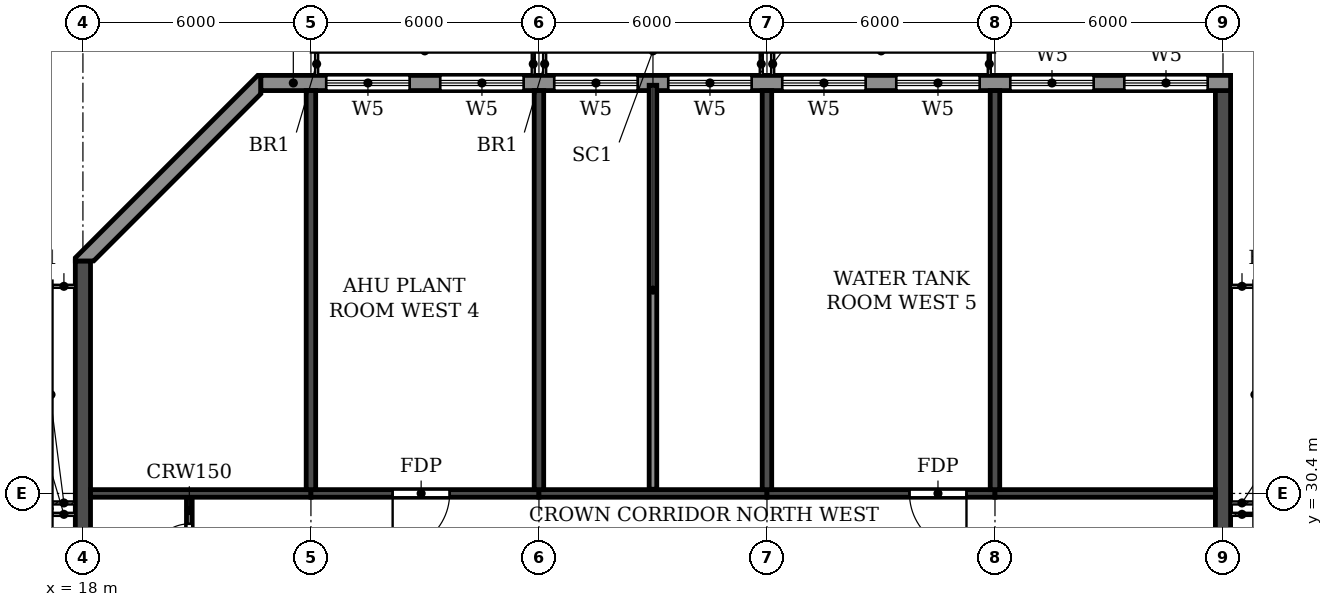
"""IFC4 building model, lengths in metres.
Left out: names, types, materials, properties, quantities, classifications, styles, units other than length and angle.
Written with IfcOpenShell. Run it as: python <this file> out.ifc"""

import sys

from ifc_helpers import new_model, si_unit, direction, frame, frame_2d, origin, place, context, subcontext, project, spatial, polyline, rectangle, outline, extrude, element, fill, save


model = new_model("IFC4")
c1 = context("Model", 3, precision=1e-05, world=origin(), true_north=direction((0.0, 1.0)))
c2 = subcontext(c1, "Body", "Model", "MODEL_VIEW")
j1 = project(units=[si_unit("LENGTHUNIT", "METRE"), si_unit("PLANEANGLEUNIT", "RADIAN")], contexts=[c1])
p1 = place(None, origin())
s1 = spatial("IfcSite", under=j1, at=p1, CompositionType="ELEMENT")
p2 = place(p1, origin())
s2 = spatial("IfcBuilding", under=s1, at=p2, CompositionType="ELEMENT")
p3 = place(p2, frame((0.0, 0.0, 279.0)))
s3 = spatial("IfcBuildingStorey", under=s2, at=p3, CompositionType="ELEMENT", Elevation=279.0)
for number, where, z_axis, x_axis in (
    (1, (24.0, 30.5, 0.0), (0.0, 0.0, 1.0), (0.0, 1.0, 0.0)),
    (2, (30.0, 30.5, 0.0), (0.0, 0.0, 1.0), (0.0, 1.0, 0.0)),
    (3, (36.0, 30.5, 0.0), (0.0, 0.0, 1.0), (0.0, 1.0, 0.0)),
    (4, (42.0, 30.5, 0.0), (0.0, 0.0, 1.0), (0.0, 1.0, 0.0)),
):
    element("IfcWall", number, at=place(p3, frame(where, z_axis=z_axis, x_axis=x_axis)), inside=s3, PredefinedType="SHEAR", context=c2, shape_type="SweptSolid", body=[
        extrude(rectangle(XDim=10.5, YDim=0.25, at=frame_2d((5.25, 0.0))), origin(), (0.0, 0.0, 1.0), 3.05),
    ])
p4 = place(p3, frame((18.0, 4.683, 0.0), z_axis=(0.0, 0.0, 1.0), x_axis=(0.0, 1.0, 0.0)))
e5 = element("IfcWall", 5, at=p4, inside=s3, PredefinedType="SHEAR", context=c2, shape_type="SweptSolid", body=[
    extrude(rectangle(XDim=31.834, YDim=0.4, at=frame_2d((15.917, 0.0))), origin(), (0.0, 0.0, 1.0), 3.05),
])
p5 = place(p3, frame((48.0, 0.2, 0.0), z_axis=(0.0, 0.0, 1.0), x_axis=(0.0, 1.0, 0.0)))
e6 = element("IfcWall", 6, at=p5, inside=s3, PredefinedType="SHEAR", context=c2, shape_type="SweptSolid", body=[
    extrude(rectangle(XDim=40.8, YDim=0.4, at=frame_2d((20.4, 0.0))), origin(), (0.0, 0.0, 1.0), 3.05),
])
p6 = place(p3, frame((18.2, 30.4, 0.0), z_axis=(0.0, 0.0, 1.0), x_axis=(1.0, 0.0, 0.0)))
e7 = element("IfcWall", 7, at=p6, inside=s3, PredefinedType="SHEAR", context=c2, shape_type="SweptSolid", body=[
    extrude(rectangle(XDim=5.8, YDim=0.2, at=frame_2d((2.9, 0.0))), origin(), (0.0, 0.0, 1.0), 2.45),
])
p7 = place(p3, frame((24.0, 30.4, 0.0), z_axis=(0.0, 0.0, 1.0), x_axis=(1.0, 0.0, 0.0)))
e8 = element("IfcWall", 8, at=p7, inside=s3, PredefinedType="SHEAR", context=c2, shape_type="SweptSolid", body=[
    extrude(rectangle(XDim=6.0, YDim=0.2, at=frame_2d((3.0, 0.0))), origin(), (0.0, 0.0, 1.0), 2.45),
])
p8 = place(p7, frame((2.15, 0.0, 0.0)))
e9 = element("IfcOpeningElement", 9, at=p8, cuts=e8, PredefinedType="OPENING", context=c2, shape_type="SweptSolid", body=[
    extrude(rectangle(XDim=1.5, YDim=2.1, at=frame_2d((0.75, 1.05))), frame((0.0, 0.11, 0.0), z_axis=(0.0, -1.0, 0.0), x_axis=(1.0, 0.0, 0.0)), (0.0, 0.0, 1.0), 0.22),
])
p9 = place(p3, frame((30.0, 30.4, 0.0), z_axis=(0.0, 0.0, 1.0), x_axis=(1.0, 0.0, 0.0)))
e10 = element("IfcWall", 10, at=p9, inside=s3, PredefinedType="SHEAR", context=c2, shape_type="SweptSolid", body=[
    extrude(rectangle(XDim=6.0, YDim=0.2, at=frame_2d((3.0, 0.0))), origin(), (0.0, 0.0, 1.0), 2.45),
])
p10 = place(p3, frame((36.0, 30.4, 0.0), z_axis=(0.0, 0.0, 1.0), x_axis=(1.0, 0.0, 0.0)))
e11 = element("IfcWall", 11, at=p10, inside=s3, PredefinedType="SHEAR", context=c2, shape_type="SweptSolid", body=[
    extrude(rectangle(XDim=6.0, YDim=0.2, at=frame_2d((3.0, 0.0))), origin(), (0.0, 0.0, 1.0), 2.45),
])
p11 = place(p10, frame((3.75, 0.0, 0.0)))
e12 = element("IfcOpeningElement", 12, at=p11, cuts=e11, PredefinedType="OPENING", context=c2, shape_type="SweptSolid", body=[
    extrude(rectangle(XDim=1.5, YDim=2.1, at=frame_2d((0.75, 1.05))), frame((0.0, 0.11, 0.0), z_axis=(0.0, -1.0, 0.0), x_axis=(1.0, 0.0, 0.0)), (0.0, 0.0, 1.0), 0.22),
])
p12 = place(p3, frame((42.0, 30.4, 0.0), z_axis=(0.0, 0.0, 1.0), x_axis=(1.0, 0.0, 0.0)))
e13 = element("IfcWall", 13, at=p12, inside=s3, PredefinedType="SHEAR", context=c2, shape_type="SweptSolid", body=[
    extrude(rectangle(XDim=5.8, YDim=0.2, at=frame_2d((2.9, 0.0))), origin(), (0.0, 0.0, 1.0), 2.45),
])
p13 = place(p3, frame((48.2, 41.2, 0.0), z_axis=(0.0, 0.0, 1.0), x_axis=(-1.0, 0.0, 0.0)))
e14 = element("IfcWall", 14, at=p13, inside=s3, PredefinedType="STANDARD", context=c2, shape_type="SweptSolid", body=[
    extrude(rectangle(XDim=25.517, YDim=0.4, at=frame_2d((12.759, 0.0))), origin(), (0.0, 0.0, 1.0), 3.05),
])
p14 = place(p13, frame((21.6, 0.0, 0.6)))
e15 = element("IfcOpeningElement", 15, at=p14, cuts=e14, PredefinedType="OPENING", context=c2, shape_type="SweptSolid", body=[
    extrude(rectangle(XDim=2.2, YDim=2.4, at=frame_2d((1.1, 1.2))), frame((0.0, 0.21, 0.0), z_axis=(0.0, -1.0, 0.0), x_axis=(1.0, 0.0, 0.0)), (0.0, 0.0, 1.0), 0.42),
])
p15 = place(p13, frame((18.6, 0.0, 0.6)))
e16 = element("IfcOpeningElement", 16, at=p15, cuts=e14, PredefinedType="OPENING", context=c2, shape_type="SweptSolid", body=[
    extrude(rectangle(XDim=2.2, YDim=2.4, at=frame_2d((1.1, 1.2))), frame((0.0, 0.21, 0.0), z_axis=(0.0, -1.0, 0.0), x_axis=(1.0, 0.0, 0.0)), (0.0, 0.0, 1.0), 0.42),
])
p16 = place(p13, frame((15.6, 0.0, 0.6)))
e17 = element("IfcOpeningElement", 17, at=p16, cuts=e14, PredefinedType="OPENING", context=c2, shape_type="SweptSolid", body=[
    extrude(rectangle(XDim=2.2, YDim=2.4, at=frame_2d((1.1, 1.2))), frame((0.0, 0.21, 0.0), z_axis=(0.0, -1.0, 0.0), x_axis=(1.0, 0.0, 0.0)), (0.0, 0.0, 1.0), 0.42),
])
p17 = place(p13, frame((12.6, 0.0, 0.6)))
e18 = element("IfcOpeningElement", 18, at=p17, cuts=e14, PredefinedType="OPENING", context=c2, shape_type="SweptSolid", body=[
    extrude(rectangle(XDim=2.2, YDim=2.4, at=frame_2d((1.1, 1.2))), frame((0.0, 0.21, 0.0), z_axis=(0.0, -1.0, 0.0), x_axis=(1.0, 0.0, 0.0)), (0.0, 0.0, 1.0), 0.42),
])
p18 = place(p13, frame((9.6, 0.0, 0.6)))
e19 = element("IfcOpeningElement", 19, at=p18, cuts=e14, PredefinedType="OPENING", context=c2, shape_type="SweptSolid", body=[
    extrude(rectangle(XDim=2.2, YDim=2.4, at=frame_2d((1.1, 1.2))), frame((0.0, 0.21, 0.0), z_axis=(0.0, -1.0, 0.0), x_axis=(1.0, 0.0, 0.0)), (0.0, 0.0, 1.0), 0.42),
])
p19 = place(p13, frame((6.6, 0.0, 0.6)))
e20 = element("IfcOpeningElement", 20, at=p19, cuts=e14, PredefinedType="OPENING", context=c2, shape_type="SweptSolid", body=[
    extrude(rectangle(XDim=2.2, YDim=2.4, at=frame_2d((1.1, 1.2))), frame((0.0, 0.21, 0.0), z_axis=(0.0, -1.0, 0.0), x_axis=(1.0, 0.0, 0.0)), (0.0, 0.0, 1.0), 0.42),
])
p20 = place(p13, frame((3.6, 0.0, 0.6)))
e21 = element("IfcOpeningElement", 21, at=p20, cuts=e14, PredefinedType="OPENING", context=c2, shape_type="SweptSolid", body=[
    extrude(rectangle(XDim=2.2, YDim=2.4, at=frame_2d((1.1, 1.2))), frame((0.0, 0.21, 0.0), z_axis=(0.0, -1.0, 0.0), x_axis=(1.0, 0.0, 0.0)), (0.0, 0.0, 1.0), 0.42),
])
p21 = place(p13, frame((0.6, 0.0, 0.6)))
e22 = element("IfcOpeningElement", 22, at=p21, cuts=e14, PredefinedType="OPENING", context=c2, shape_type="SweptSolid", body=[
    extrude(rectangle(XDim=2.2, YDim=2.4, at=frame_2d((1.1, 1.2))), frame((0.0, 0.21, 0.0), z_axis=(0.0, -1.0, 0.0), x_axis=(1.0, 0.0, 0.0)), (0.0, 0.0, 1.0), 0.42),
])
p22 = place(p3, origin())
e23 = element("IfcWall", 23, at=p22, inside=s3, PredefinedType="STANDARD", context=c2, shape_type="SweptSolid", body=[
    extrude(outline(polyline([(22.683, 41.4), (22.6, 41.4), (17.8, 36.6), (17.8, 36.517), (18.283, 36.517), (22.683, 40.917), (22.683, 41.4)])), origin(), (0.0, 0.0, 1.0), 3.05),
])
p23 = place(p3, frame((20.8, 27.9, 0.0), z_axis=(0.0, 0.0, 1.0), x_axis=(0.0, 1.0, 0.0)))
e24 = element("IfcWall", 24, at=p23, inside=s3, PredefinedType="PARTITIONING", context=c2, shape_type="SweptSolid", body=[
    extrude(rectangle(XDim=2.39, YDim=0.15, at=frame_2d((1.195, 0.0))), origin(), (0.0, 0.0, 1.0), 3.05),
])
p24 = place(p23, frame((0.7, 0.0, 0.0)))
e25 = element("IfcOpeningElement", 25, at=p24, cuts=e24, PredefinedType="OPENING", context=c2, shape_type="SweptSolid", body=[
    extrude(rectangle(XDim=1.0, YDim=2.1, at=frame_2d((0.5, 1.05))), frame((0.0, 0.085, 0.0), z_axis=(0.0, -1.0, 0.0), x_axis=(1.0, 0.0, 0.0)), (0.0, 0.0, 1.0), 0.17),
])
p25 = place(p3, frame((33.0, 30.51, 0.0), z_axis=(0.0, 0.0, 1.0), x_axis=(0.0, 1.0, 0.0)))
e26 = element("IfcWall", 26, at=p25, inside=s3, PredefinedType="PARTITIONING", context=c2, shape_type="SweptSolid", body=[
    extrude(rectangle(XDim=10.63, YDim=0.2, at=frame_2d((5.315, 0.0))), origin(), (0.0, 0.0, 1.0), 3.05),
])
p26 = place(p14, origin())
e27 = element("IfcWindow", 27, at=p26, inside=s3, PartitioningType="TRIPLE_PANEL_HORIZONTAL", PredefinedType="WINDOW", context=c2, shape_type="SweptSolid", body=[
    extrude(rectangle(XDim=2.2, YDim=2.4, at=frame_2d((1.1, 1.2))), frame((0.0, 0.03, 0.0), z_axis=(0.0, -1.0, 0.0), x_axis=(1.0, 0.0, 0.0)), (0.0, 0.0, 1.0), 0.06),
])
fill(e15, e27)
p27 = place(p15, origin())
e28 = element("IfcWindow", 28, at=p27, inside=s3, PartitioningType="TRIPLE_PANEL_HORIZONTAL", PredefinedType="WINDOW", context=c2, shape_type="SweptSolid", body=[
    extrude(rectangle(XDim=2.2, YDim=2.4, at=frame_2d((1.1, 1.2))), frame((0.0, 0.03, 0.0), z_axis=(0.0, -1.0, 0.0), x_axis=(1.0, 0.0, 0.0)), (0.0, 0.0, 1.0), 0.06),
])
fill(e16, e28)
p28 = place(p16, origin())
e29 = element("IfcWindow", 29, at=p28, inside=s3, PartitioningType="TRIPLE_PANEL_HORIZONTAL", PredefinedType="WINDOW", context=c2, shape_type="SweptSolid", body=[
    extrude(rectangle(XDim=2.2, YDim=2.4, at=frame_2d((1.1, 1.2))), frame((0.0, 0.03, 0.0), z_axis=(0.0, -1.0, 0.0), x_axis=(1.0, 0.0, 0.0)), (0.0, 0.0, 1.0), 0.06),
])
fill(e17, e29)
p29 = place(p17, origin())
e30 = element("IfcWindow", 30, at=p29, inside=s3, PartitioningType="TRIPLE_PANEL_HORIZONTAL", PredefinedType="WINDOW", context=c2, shape_type="SweptSolid", body=[
    extrude(rectangle(XDim=2.2, YDim=2.4, at=frame_2d((1.1, 1.2))), frame((0.0, 0.03, 0.0), z_axis=(0.0, -1.0, 0.0), x_axis=(1.0, 0.0, 0.0)), (0.0, 0.0, 1.0), 0.06),
])
fill(e18, e30)
p30 = place(p18, origin())
e31 = element("IfcWindow", 31, at=p30, inside=s3, PartitioningType="TRIPLE_PANEL_HORIZONTAL", PredefinedType="WINDOW", context=c2, shape_type="SweptSolid", body=[
    extrude(rectangle(XDim=2.2, YDim=2.4, at=frame_2d((1.1, 1.2))), frame((0.0, 0.03, 0.0), z_axis=(0.0, -1.0, 0.0), x_axis=(1.0, 0.0, 0.0)), (0.0, 0.0, 1.0), 0.06),
])
fill(e19, e31)
p31 = place(p19, origin())
e32 = element("IfcWindow", 32, at=p31, inside=s3, PartitioningType="TRIPLE_PANEL_HORIZONTAL", PredefinedType="WINDOW", context=c2, shape_type="SweptSolid", body=[
    extrude(rectangle(XDim=2.2, YDim=2.4, at=frame_2d((1.1, 1.2))), frame((0.0, 0.03, 0.0), z_axis=(0.0, -1.0, 0.0), x_axis=(1.0, 0.0, 0.0)), (0.0, 0.0, 1.0), 0.06),
])
fill(e20, e32)
p32 = place(p20, origin())
e33 = element("IfcWindow", 33, at=p32, inside=s3, PartitioningType="TRIPLE_PANEL_HORIZONTAL", PredefinedType="WINDOW", context=c2, shape_type="SweptSolid", body=[
    extrude(rectangle(XDim=2.2, YDim=2.4, at=frame_2d((1.1, 1.2))), frame((0.0, 0.03, 0.0), z_axis=(0.0, -1.0, 0.0), x_axis=(1.0, 0.0, 0.0)), (0.0, 0.0, 1.0), 0.06),
])
fill(e21, e33)
p33 = place(p21, origin())
e34 = element("IfcWindow", 34, at=p33, inside=s3, PartitioningType="TRIPLE_PANEL_HORIZONTAL", PredefinedType="WINDOW", context=c2, shape_type="SweptSolid", body=[
    extrude(rectangle(XDim=2.2, YDim=2.4, at=frame_2d((1.1, 1.2))), frame((0.0, 0.03, 0.0), z_axis=(0.0, -1.0, 0.0), x_axis=(1.0, 0.0, 0.0)), (0.0, 0.0, 1.0), 0.06),
])
fill(e22, e34)
p34 = place(p8, frame((1.5, 0.0, 0.0), z_axis=(0.0, 0.0, 1.0), x_axis=(-1.0, 0.0, 0.0)))
e35 = element("IfcDoor", 35, at=p34, inside=s3, OperationType="DOUBLE_DOOR_SINGLE_SWING", PredefinedType="DOOR", context=c2, shape_type="SweptSolid", body=[
    extrude(rectangle(XDim=1.5, YDim=2.1, at=frame_2d((0.75, 1.05))), frame((0.0, 0.025, 0.0), z_axis=(0.0, -1.0, 0.0), x_axis=(1.0, 0.0, 0.0)), (0.0, 0.0, 1.0), 0.05),
])
fill(e9, e35)
p35 = place(p11, frame((1.5, 0.0, 0.0), z_axis=(0.0, 0.0, 1.0), x_axis=(-1.0, 0.0, 0.0)))
e36 = element("IfcDoor", 36, at=p35, inside=s3, OperationType="DOUBLE_DOOR_SINGLE_SWING", PredefinedType="DOOR", context=c2, shape_type="SweptSolid", body=[
    extrude(rectangle(XDim=1.5, YDim=2.1, at=frame_2d((0.75, 1.05))), frame((0.0, 0.025, 0.0), z_axis=(0.0, -1.0, 0.0), x_axis=(1.0, 0.0, 0.0)), (0.0, 0.0, 1.0), 0.05),
])
fill(e12, e36)
p36 = place(p24, origin())
e37 = element("IfcDoor", 37, at=p36, inside=s3, OperationType="SINGLE_SWING_LEFT", PredefinedType="DOOR", context=c2, shape_type="SweptSolid", body=[
    extrude(rectangle(XDim=1.0, YDim=2.1, at=frame_2d((0.5, 1.05))), frame((0.0, 0.025, 0.0), z_axis=(0.0, -1.0, 0.0), x_axis=(1.0, 0.0, 0.0)), (0.0, 0.0, 1.0), 0.05),
])
fill(e25, e37)
save(model, sys.argv[1])
